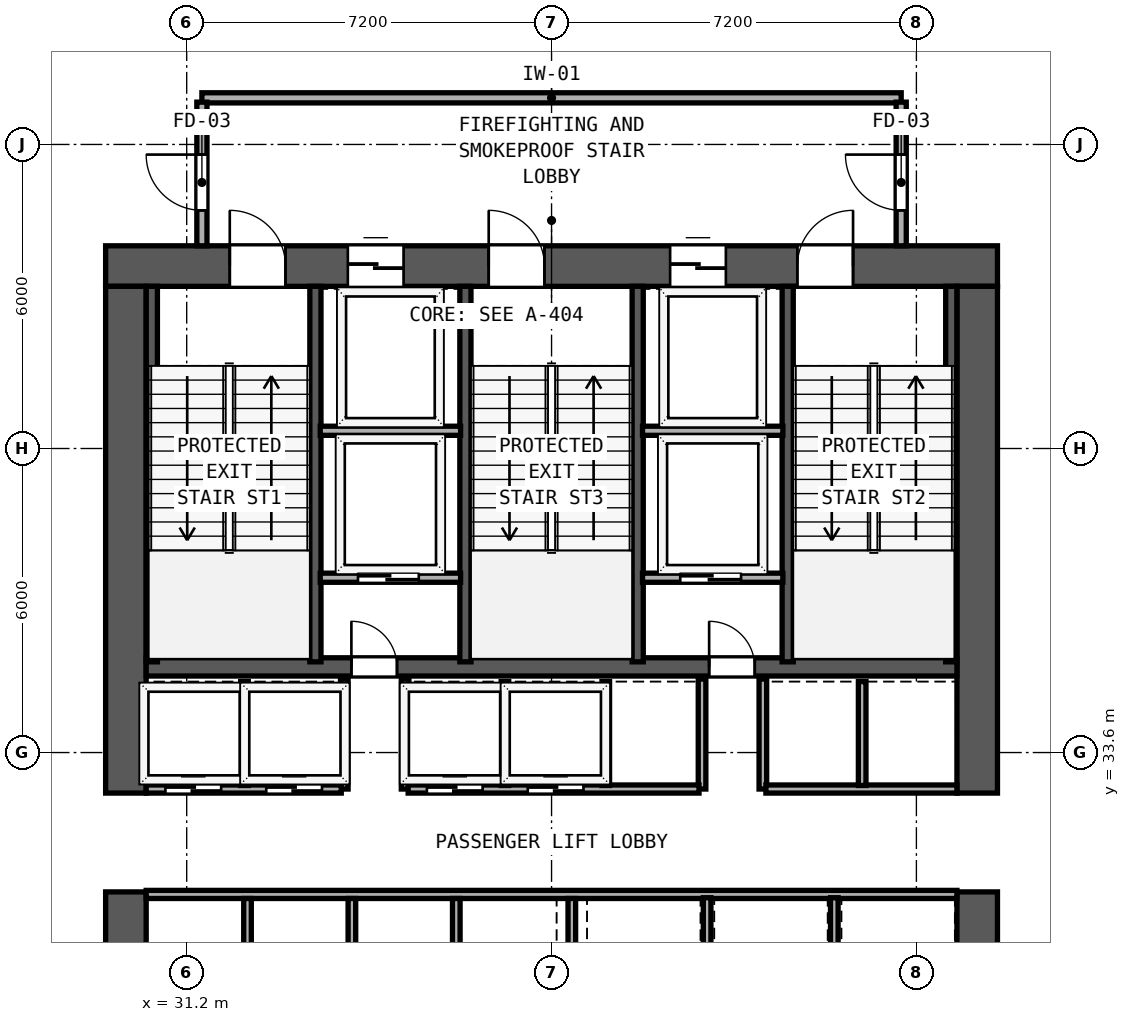
"""IFC4 building model, lengths in metres.
Left out: names, types, materials, properties, quantities, classifications, styles, units other than length and angle.
Written with IfcOpenShell. Run it as: python <this file> out.ifc"""

import sys

from ifc_helpers import new_model, si_unit, direction, frame, frame_2d, origin, place, context, subcontext, project, spatial, rectangle, extrude, element, fill, save


model = new_model("IFC4")
c1 = context("Model", 3, precision=1e-05, world=origin(), true_north=direction((0.0, 1.0)))
c2 = subcontext(c1, "Body", "Model", "MODEL_VIEW")
j1 = project(units=[si_unit("LENGTHUNIT", "METRE"), si_unit("PLANEANGLEUNIT", "RADIAN")], contexts=[c1])
p1 = place(None, origin())
s1 = spatial("IfcSite", under=j1, at=p1, CompositionType="ELEMENT")
p2 = place(p1, origin())
s2 = spatial("IfcBuilding", under=s1, at=p2, CompositionType="ELEMENT")
p3 = place(p2, frame((0.0, 0.0, 5.4)))
s3 = spatial("IfcBuildingStorey", under=s2, at=p3, CompositionType="ELEMENT", Elevation=5.4)
p4 = place(p3, frame((29.6, 43.2, 0.0), z_axis=(0.0, 0.0, 1.0), x_axis=(1.0, 0.0, 0.0)))
e1 = element("IfcWall", 1, at=p4, inside=s3, PredefinedType="SHEAR", context=c2, shape_type="SweptSolid", body=[
    extrude(rectangle(XDim=17.6, YDim=0.8, at=frame_2d((8.8, 0.0))), origin(), (0.0, 0.0, 1.0), 4.56),
])
p5 = place(p4, frame((2.45, 0.0, 0.0)))
e2 = element("IfcOpeningElement", 2, at=p5, cuts=e1, PredefinedType="OPENING", context=c2, shape_type="SweptSolid", body=[
    extrude(rectangle(XDim=1.1, YDim=2.15, at=frame_2d((0.55, 1.075))), frame((0.0, 0.41, 0.0), z_axis=(0.0, -1.0, 0.0), x_axis=(1.0, 0.0, 0.0)), (0.0, 0.0, 1.0), 0.82),
])
p6 = place(p4, frame((7.56, 0.0, 0.0)))
e3 = element("IfcOpeningElement", 3, at=p6, cuts=e1, PredefinedType="OPENING", context=c2, shape_type="SweptSolid", body=[
    extrude(rectangle(XDim=1.1, YDim=2.15, at=frame_2d((0.55, 1.075))), frame((0.0, 0.41, 0.0), z_axis=(0.0, -1.0, 0.0), x_axis=(1.0, 0.0, 0.0)), (0.0, 0.0, 1.0), 0.82),
])
p7 = place(p4, frame((13.65, 0.0, 0.0)))
e4 = element("IfcOpeningElement", 4, at=p7, cuts=e1, PredefinedType="OPENING", context=c2, shape_type="SweptSolid", body=[
    extrude(rectangle(XDim=1.1, YDim=2.15, at=frame_2d((0.55, 1.075))), frame((0.0, 0.41, 0.0), z_axis=(0.0, -1.0, 0.0), x_axis=(1.0, 0.0, 0.0)), (0.0, 0.0, 1.0), 0.82),
])
p8 = place(p4, frame((4.78, 0.0, 0.0)))
e5 = element("IfcOpeningElement", 5, at=p8, cuts=e1, PredefinedType="OPENING", context=c2, shape_type="SweptSolid", body=[
    extrude(rectangle(XDim=1.1, YDim=2.2, at=frame_2d((0.55, 1.1))), frame((0.0, 0.41, 0.0), z_axis=(0.0, -1.0, 0.0), x_axis=(1.0, 0.0, 0.0)), (0.0, 0.0, 1.0), 0.82),
])
p9 = place(p4, frame((11.14, 0.0, 0.0)))
e6 = element("IfcOpeningElement", 6, at=p9, cuts=e1, PredefinedType="OPENING", context=c2, shape_type="SweptSolid", body=[
    extrude(rectangle(XDim=1.1, YDim=2.2, at=frame_2d((0.55, 1.1))), frame((0.0, 0.41, 0.0), z_axis=(0.0, -1.0, 0.0), x_axis=(1.0, 0.0, 0.0)), (0.0, 0.0, 1.0), 0.82),
])
p10 = place(p3, frame((30.0, 26.8, 0.0), z_axis=(0.0, 0.0, 1.0), x_axis=(0.0, 1.0, 0.0)))
e7 = element("IfcWall", 7, at=p10, inside=s3, PredefinedType="SHEAR", context=c2, shape_type="SweptSolid", body=[
    extrude(rectangle(XDim=4.05, YDim=0.8, at=frame_2d((2.025, 0.0))), origin(), (0.0, 0.0, 1.0), 4.56),
])
p11 = place(p3, frame((30.0, 32.8, 0.0), z_axis=(0.0, 0.0, 1.0), x_axis=(0.0, 1.0, 0.0)))
e8 = element("IfcWall", 8, at=p11, inside=s3, PredefinedType="SHEAR", context=c2, shape_type="SweptSolid", body=[
    extrude(rectangle(XDim=10.0, YDim=0.8, at=frame_2d((5.0, 0.0))), origin(), (0.0, 0.0, 1.0), 4.56),
])
p12 = place(p3, frame((46.8, 26.8, 0.0), z_axis=(0.0, 0.0, 1.0), x_axis=(0.0, 1.0, 0.0)))
e9 = element("IfcWall", 9, at=p12, inside=s3, PredefinedType="SHEAR", context=c2, shape_type="SweptSolid", body=[
    extrude(rectangle(XDim=4.05, YDim=0.8, at=frame_2d((2.025, 0.0))), origin(), (0.0, 0.0, 1.0), 4.56),
])
p13 = place(p3, frame((46.8, 32.8, 0.0), z_axis=(0.0, 0.0, 1.0), x_axis=(0.0, 1.0, 0.0)))
e10 = element("IfcWall", 10, at=p13, inside=s3, PredefinedType="SHEAR", context=c2, shape_type="SweptSolid", body=[
    extrude(rectangle(XDim=10.0, YDim=0.8, at=frame_2d((5.0, 0.0))), origin(), (0.0, 0.0, 1.0), 4.56),
])
p14 = place(p3, frame((30.4, 35.29, 0.0), z_axis=(0.0, 0.0, 1.0), x_axis=(1.0, 0.0, 0.0)))
e11 = element("IfcWall", 11, at=p14, inside=s3, PredefinedType="SHEAR", context=c2, shape_type="SweptSolid", body=[
    extrude(rectangle(XDim=16.0, YDim=0.36, at=frame_2d((8.0, 0.0))), origin(), (0.0, 0.0, 1.0), 4.56),
])
p15 = place(p14, frame((4.95, 0.0, 0.0), z_axis=(0.0, 0.0, 1.0), x_axis=(-1.0, 0.0, 0.0)))
e12 = element("IfcOpeningElement", 12, at=p15, cuts=e11, PredefinedType="OPENING", context=c2, shape_type="SweptSolid", body=[
    extrude(rectangle(XDim=0.9, YDim=2.1, at=frame_2d((0.45, 1.05))), frame((0.0, 0.19, 0.0), z_axis=(0.0, -1.0, 0.0), x_axis=(1.0, 0.0, 0.0)), (0.0, 0.0, 1.0), 0.38),
])
p16 = place(p14, frame((12.01, 0.0, 0.0), z_axis=(0.0, 0.0, 1.0), x_axis=(-1.0, 0.0, 0.0)))
e13 = element("IfcOpeningElement", 13, at=p16, cuts=e11, PredefinedType="OPENING", context=c2, shape_type="SweptSolid", body=[
    extrude(rectangle(XDim=0.9, YDim=2.1, at=frame_2d((0.45, 1.05))), frame((0.0, 0.19, 0.0), z_axis=(0.0, -1.0, 0.0), x_axis=(1.0, 0.0, 0.0)), (0.0, 0.0, 1.0), 0.38),
])
for number, where, z_axis, x_axis in (
    (14, (30.512, 35.39, 0.0), (0.0, 0.0, 1.0), (0.0, 1.0, 0.0)),
    (15, (33.74, 35.39, 0.0), (0.0, 0.0, 1.0), (0.0, 1.0, 0.0)),
    (16, (36.7, 35.39, 0.0), (0.0, 0.0, 1.0), (0.0, 1.0, 0.0)),
    (17, (40.1, 35.39, 0.0), (0.0, 0.0, 1.0), (0.0, 1.0, 0.0)),
    (18, (43.06, 35.39, 0.0), (0.0, 0.0, 1.0), (0.0, 1.0, 0.0)),
    (19, (46.288, 35.39, 0.0), (0.0, 0.0, 1.0), (0.0, 1.0, 0.0)),
):
    element("IfcWall", number, at=place(p3, frame(where, z_axis=z_axis, x_axis=x_axis)), inside=s3, PredefinedType="SHEAR", context=c2, shape_type="SweptSolid", body=[
        extrude(rectangle(XDim=7.41, YDim=0.22, at=frame_2d((3.705, 0.0))), origin(), (0.0, 0.0, 1.0), 4.56),
    ])
p17 = place(p3, frame((31.5, 46.52, 0.0), z_axis=(0.0, 0.0, 1.0), x_axis=(1.0, 0.0, 0.0)))
e20 = element("IfcWall", 20, at=p17, inside=s3, PredefinedType="SOLIDWALL", context=c2, shape_type="SweptSolid", body=[
    extrude(rectangle(XDim=13.8, YDim=0.2, at=frame_2d((6.9, 0.0))), origin(), (0.0, 0.0, 1.0), 4.56),
])
p18 = place(p3, frame((31.5, 43.6, 0.0), z_axis=(0.0, 0.0, 1.0), x_axis=(0.0, 1.0, 0.0)))
e21 = element("IfcWall", 21, at=p18, inside=s3, PredefinedType="SOLIDWALL", context=c2, shape_type="SweptSolid", body=[
    extrude(rectangle(XDim=2.835, YDim=0.2, at=frame_2d((1.417, 0.0))), origin(), (0.0, 0.0, 1.0), 4.56),
])
p19 = place(p18, frame((1.8, 0.0, 0.0), z_axis=(0.0, 0.0, 1.0), x_axis=(-1.0, 0.0, 0.0)))
e22 = element("IfcOpeningElement", 22, at=p19, cuts=e21, PredefinedType="OPENING", context=c2, shape_type="SweptSolid", body=[
    extrude(rectangle(XDim=1.1, YDim=2.15, at=frame_2d((0.55, 1.075))), frame((0.0, 0.11, 0.0), z_axis=(0.0, -1.0, 0.0), x_axis=(1.0, 0.0, 0.0)), (0.0, 0.0, 1.0), 0.22),
])
p20 = place(p3, frame((45.3, 43.6, 0.0), z_axis=(0.0, 0.0, 1.0), x_axis=(0.0, 1.0, 0.0)))
e23 = element("IfcWall", 23, at=p20, inside=s3, PredefinedType="SOLIDWALL", context=c2, shape_type="SweptSolid", body=[
    extrude(rectangle(XDim=2.835, YDim=0.2, at=frame_2d((1.417, 0.0))), origin(), (0.0, 0.0, 1.0), 4.56),
])
p21 = place(p20, frame((0.7, 0.0, 0.0)))
e24 = element("IfcOpeningElement", 24, at=p21, cuts=e23, PredefinedType="OPENING", context=c2, shape_type="SweptSolid", body=[
    extrude(rectangle(XDim=1.1, YDim=2.15, at=frame_2d((0.55, 1.075))), frame((0.0, 0.11, 0.0), z_axis=(0.0, -1.0, 0.0), x_axis=(1.0, 0.0, 0.0)), (0.0, 0.0, 1.0), 0.22),
])
for number, where, z_axis, x_axis in (
    (25, (33.835, 39.95, 0.0), (0.0, 0.0, 1.0), (1.0, 0.0, 0.0)),
    (26, (40.195, 39.95, 0.0), (0.0, 0.0, 1.0), (1.0, 0.0, 0.0)),
):
    element("IfcWall", number, at=place(p3, frame(where, z_axis=z_axis, x_axis=x_axis)), inside=s3, PredefinedType="SOLIDWALL", context=c2, shape_type="SweptSolid", body=[
        extrude(rectangle(XDim=2.77, YDim=0.18, at=frame_2d((1.385, 0.0))), origin(), (0.0, 0.0, 1.0), 4.56),
    ])
p22 = place(p3, frame((33.835, 37.05, 0.0), z_axis=(0.0, 0.0, 1.0), x_axis=(1.0, 0.0, 0.0)))
e27 = element("IfcWall", 27, at=p22, inside=s3, PredefinedType="SOLIDWALL", context=c2, shape_type="SweptSolid", body=[
    extrude(rectangle(XDim=2.77, YDim=0.18, at=frame_2d((1.385, 0.0))), origin(), (0.0, 0.0, 1.0), 4.56),
])
p23 = place(p22, frame((1.945, 0.0, 0.0), z_axis=(0.0, 0.0, 1.0), x_axis=(-1.0, 0.0, 0.0)))
e28 = element("IfcOpeningElement", 28, at=p23, cuts=e27, PredefinedType="OPENING", context=c2, shape_type="SweptSolid", body=[
    extrude(rectangle(XDim=1.2, YDim=2.2, at=frame_2d((0.6, 1.1))), frame((0.0, 0.1, 0.0), z_axis=(0.0, -1.0, 0.0), x_axis=(1.0, 0.0, 0.0)), (0.0, 0.0, 1.0), 0.2),
])
for number, where, z_axis, x_axis in (
    (29, (34.31, 32.88, 0.0), (0.0, 0.0, 1.0), (0.0, 1.0, 0.0)),
    (30, (35.51, 32.88, 0.0), (0.0, 0.0, 1.0), (0.0, 1.0, 0.0)),
):
    element("IfcWall", number, at=place(p3, frame(where, z_axis=z_axis, x_axis=x_axis)), inside=s3, PredefinedType="SOLIDWALL", context=c2, shape_type="SweptSolid", body=[
        extrude(rectangle(XDim=2.17, YDim=0.15, at=frame_2d((1.085, 0.0))), origin(), (0.0, 0.0, 1.0), 4.56),
    ])
p24 = place(p3, frame((40.195, 37.05, 0.0), z_axis=(0.0, 0.0, 1.0), x_axis=(1.0, 0.0, 0.0)))
e31 = element("IfcWall", 31, at=p24, inside=s3, PredefinedType="SOLIDWALL", context=c2, shape_type="SweptSolid", body=[
    extrude(rectangle(XDim=2.77, YDim=0.18, at=frame_2d((1.385, 0.0))), origin(), (0.0, 0.0, 1.0), 4.56),
])
p25 = place(p24, frame((1.945, 0.0, 0.0), z_axis=(0.0, 0.0, 1.0), x_axis=(-1.0, 0.0, 0.0)))
e32 = element("IfcOpeningElement", 32, at=p25, cuts=e31, PredefinedType="OPENING", context=c2, shape_type="SweptSolid", body=[
    extrude(rectangle(XDim=1.2, YDim=2.2, at=frame_2d((0.6, 1.1))), frame((0.0, 0.1, 0.0), z_axis=(0.0, -1.0, 0.0), x_axis=(1.0, 0.0, 0.0)), (0.0, 0.0, 1.0), 0.2),
])
for number, where, z_axis, x_axis in (
    (33, (41.37, 32.88, 0.0), (0.0, 0.0, 1.0), (0.0, 1.0, 0.0)),
    (34, (42.57, 32.88, 0.0), (0.0, 0.0, 1.0), (0.0, 1.0, 0.0)),
):
    element("IfcWall", number, at=place(p3, frame(where, z_axis=z_axis, x_axis=x_axis)), inside=s3, PredefinedType="SOLIDWALL", context=c2, shape_type="SweptSolid", body=[
        extrude(rectangle(XDim=2.17, YDim=0.15, at=frame_2d((1.085, 0.0))), origin(), (0.0, 0.0, 1.0), 4.56),
    ])
p26 = place(p3, frame((30.4, 32.88, 0.0), z_axis=(0.0, 0.0, 1.0), x_axis=(1.0, 0.0, 0.0)))
e35 = element("IfcWall", 35, at=p26, inside=s3, PredefinedType="SOLIDWALL", context=c2, shape_type="SweptSolid", body=[
    extrude(rectangle(XDim=3.85, YDim=0.16, at=frame_2d((1.925, 0.0))), origin(), (0.0, 0.0, 1.0), 4.56),
])
p27 = place(p26, frame((1.48, 0.0, 0.0), z_axis=(0.0, 0.0, 1.0), x_axis=(-1.0, 0.0, 0.0)))
e36 = element("IfcOpeningElement", 36, at=p27, cuts=e35, PredefinedType="OPENING", context=c2, shape_type="SweptSolid", body=[
    extrude(rectangle(XDim=1.1, YDim=2.2, at=frame_2d((0.55, 1.1))), frame((0.0, 0.09, 0.0), z_axis=(0.0, -1.0, 0.0), x_axis=(1.0, 0.0, 0.0)), (0.0, 0.0, 1.0), 0.18),
])
p28 = place(p26, frame((3.47, 0.0, 0.0), z_axis=(0.0, 0.0, 1.0), x_axis=(-1.0, 0.0, 0.0)))
e37 = element("IfcOpeningElement", 37, at=p28, cuts=e35, PredefinedType="OPENING", context=c2, shape_type="SweptSolid", body=[
    extrude(rectangle(XDim=1.1, YDim=2.2, at=frame_2d((0.55, 1.1))), frame((0.0, 0.09, 0.0), z_axis=(0.0, -1.0, 0.0), x_axis=(1.0, 0.0, 0.0)), (0.0, 0.0, 1.0), 0.18),
])
p29 = place(p3, frame((35.57, 32.88, 0.0), z_axis=(0.0, 0.0, 1.0), x_axis=(1.0, 0.0, 0.0)))
e38 = element("IfcWall", 38, at=p29, inside=s3, PredefinedType="SOLIDWALL", context=c2, shape_type="SweptSolid", body=[
    extrude(rectangle(XDim=5.74, YDim=0.16, at=frame_2d((2.87, 0.0))), origin(), (0.0, 0.0, 1.0), 4.56),
])
p30 = place(p29, frame((1.47, 0.0, 0.0), z_axis=(0.0, 0.0, 1.0), x_axis=(-1.0, 0.0, 0.0)))
e39 = element("IfcOpeningElement", 39, at=p30, cuts=e38, PredefinedType="OPENING", context=c2, shape_type="SweptSolid", body=[
    extrude(rectangle(XDim=1.1, YDim=2.2, at=frame_2d((0.55, 1.1))), frame((0.0, 0.09, 0.0), z_axis=(0.0, -1.0, 0.0), x_axis=(1.0, 0.0, 0.0)), (0.0, 0.0, 1.0), 0.18),
])
p31 = place(p29, frame((3.46, 0.0, 0.0), z_axis=(0.0, 0.0, 1.0), x_axis=(-1.0, 0.0, 0.0)))
e40 = element("IfcOpeningElement", 40, at=p31, cuts=e38, PredefinedType="OPENING", context=c2, shape_type="SweptSolid", body=[
    extrude(rectangle(XDim=1.1, YDim=2.2, at=frame_2d((0.55, 1.1))), frame((0.0, 0.09, 0.0), z_axis=(0.0, -1.0, 0.0), x_axis=(1.0, 0.0, 0.0)), (0.0, 0.0, 1.0), 0.18),
])
p32 = place(p3, frame((42.63, 32.88, 0.0), z_axis=(0.0, 0.0, 1.0), x_axis=(1.0, 0.0, 0.0)))
e41 = element("IfcWall", 41, at=p32, inside=s3, PredefinedType="SOLIDWALL", context=c2, shape_type="SweptSolid", body=[
    extrude(rectangle(XDim=3.77, YDim=0.16, at=frame_2d((1.885, 0.0))), origin(), (0.0, 0.0, 1.0), 4.56),
])
for number, where, z_axis, x_axis in (
    (42, (32.34, 32.95, 0.0), (0.0, 0.0, 1.0), (0.0, 1.0, 0.0)),
    (43, (37.48, 32.95, 0.0), (0.0, 0.0, 1.0), (0.0, 1.0, 0.0)),
    (44, (39.47, 32.95, 0.0), (0.0, 0.0, 1.0), (0.0, 1.0, 0.0)),
    (45, (44.53, 32.95, 0.0), (0.0, 0.0, 1.0), (0.0, 1.0, 0.0)),
):
    element("IfcWall", number, at=place(p3, frame(where, z_axis=z_axis, x_axis=x_axis)), inside=s3, PredefinedType="SOLIDWALL", context=c2, shape_type="SweptSolid", body=[
        extrude(rectangle(XDim=2.05, YDim=0.15, at=frame_2d((1.025, 0.0))), origin(), (0.0, 0.0, 1.0), 4.56),
    ])
p33 = place(p3, frame((30.4, 30.8, 0.0), z_axis=(0.0, 0.0, 1.0), x_axis=(1.0, 0.0, 0.0)))
e46 = element("IfcWall", 46, at=p33, inside=s3, PredefinedType="SOLIDWALL", context=c2, shape_type="SweptSolid", body=[
    extrude(rectangle(XDim=16.0, YDim=0.16, at=frame_2d((8.0, 0.0))), origin(), (0.0, 0.0, 1.0), 4.56),
])
for number, where, z_axis, x_axis in (
    (47, (32.4, 28.735, 0.0), (0.0, 0.0, 1.0), (0.0, 1.0, 0.0)),
    (48, (34.46, 28.735, 0.0), (0.0, 0.0, 1.0), (0.0, 1.0, 0.0)),
    (49, (36.52, 28.735, 0.0), (0.0, 0.0, 1.0), (0.0, 1.0, 0.0)),
    (50, (38.8, 28.735, 0.0), (0.0, 0.0, 1.0), (0.0, 1.0, 0.0)),
):
    element("IfcWall", number, at=place(p3, frame(where, z_axis=z_axis, x_axis=x_axis)), inside=s3, PredefinedType="SOLIDWALL", context=c2, shape_type="SweptSolid", body=[
        extrude(rectangle(XDim=1.985, YDim=0.15, at=frame_2d((0.992, 0.0))), origin(), (0.0, 0.0, 1.0), 4.56),
    ])
for number, where, z_axis, x_axis in (
    (51, (41.47, 28.75, 0.0), (0.0, 0.0, 1.0), (0.0, 1.0, 0.0)),
    (52, (43.98, 28.75, 0.0), (0.0, 0.0, 1.0), (0.0, 1.0, 0.0)),
):
    element("IfcWall", number, at=place(p3, frame(where, z_axis=z_axis, x_axis=x_axis)), inside=s3, PredefinedType="SOLIDWALL", context=c2, shape_type="SweptSolid", body=[
        extrude(rectangle(XDim=1.985, YDim=0.15, at=frame_2d((0.993, 0.0))), origin(), (0.0, 0.0, 1.0), 4.56),
    ])
p34 = place(p5, origin())
e53 = element("IfcDoor", 53, at=p34, inside=s3, OperationType="SINGLE_SWING_LEFT", PredefinedType="DOOR", context=c2, shape_type="SweptSolid", body=[
    extrude(rectangle(XDim=1.1, YDim=2.15, at=frame_2d((0.55, 1.075))), frame((0.0, 0.185, 0.0), z_axis=(0.0, -1.0, 0.0), x_axis=(1.0, 0.0, 0.0)), (0.0, 0.0, 1.0), 0.05),
])
fill(e2, e53)
p35 = place(p6, origin())
e54 = element("IfcDoor", 54, at=p35, inside=s3, OperationType="SINGLE_SWING_LEFT", PredefinedType="DOOR", context=c2, shape_type="SweptSolid", body=[
    extrude(rectangle(XDim=1.1, YDim=2.15, at=frame_2d((0.55, 1.075))), frame((0.0, 0.185, 0.0), z_axis=(0.0, -1.0, 0.0), x_axis=(1.0, 0.0, 0.0)), (0.0, 0.0, 1.0), 0.05),
])
fill(e3, e54)
p36 = place(p7, origin())
e55 = element("IfcDoor", 55, at=p36, inside=s3, OperationType="SINGLE_SWING_RIGHT", PredefinedType="DOOR", context=c2, shape_type="SweptSolid", body=[
    extrude(rectangle(XDim=1.1, YDim=2.15, at=frame_2d((0.55, 1.075))), frame((0.0, 0.185, 0.0), z_axis=(0.0, -1.0, 0.0), x_axis=(1.0, 0.0, 0.0)), (0.0, 0.0, 1.0), 0.05),
])
fill(e4, e55)
p37 = place(p19, origin())
e56 = element("IfcDoor", 56, at=p37, inside=s3, OperationType="SINGLE_SWING_LEFT", PredefinedType="DOOR", context=c2, shape_type="SweptSolid", body=[
    extrude(rectangle(XDim=1.1, YDim=2.15, at=frame_2d((0.55, 1.075))), frame((0.0, 0.025, 0.0), z_axis=(0.0, -1.0, 0.0), x_axis=(1.0, 0.0, 0.0)), (0.0, 0.0, 1.0), 0.05),
])
fill(e22, e56)
p38 = place(p21, origin())
e57 = element("IfcDoor", 57, at=p38, inside=s3, OperationType="SINGLE_SWING_RIGHT", PredefinedType="DOOR", context=c2, shape_type="SweptSolid", body=[
    extrude(rectangle(XDim=1.1, YDim=2.15, at=frame_2d((0.55, 1.075))), frame((0.0, 0.025, 0.0), z_axis=(0.0, -1.0, 0.0), x_axis=(1.0, 0.0, 0.0)), (0.0, 0.0, 1.0), 0.05),
])
fill(e24, e57)
p39 = place(p8, origin())
e58 = element("IfcDoor", 58, at=p39, inside=s3, OperationType="SLIDING_TO_LEFT", PredefinedType="DOOR", context=c2, shape_type="SweptSolid", body=[
    extrude(rectangle(XDim=1.1, YDim=2.2, at=frame_2d((0.55, 1.1))), frame((0.0, 0.185, 0.0), z_axis=(0.0, -1.0, 0.0), x_axis=(1.0, 0.0, 0.0)), (0.0, 0.0, 1.0), 0.05),
])
fill(e5, e58)
p40 = place(p9, origin())
e59 = element("IfcDoor", 59, at=p40, inside=s3, OperationType="SLIDING_TO_LEFT", PredefinedType="DOOR", context=c2, shape_type="SweptSolid", body=[
    extrude(rectangle(XDim=1.1, YDim=2.2, at=frame_2d((0.55, 1.1))), frame((0.0, 0.185, 0.0), z_axis=(0.0, -1.0, 0.0), x_axis=(1.0, 0.0, 0.0)), (0.0, 0.0, 1.0), 0.05),
])
fill(e6, e59)
p41 = place(p23, origin())
e60 = element("IfcDoor", 60, at=p41, inside=s3, OperationType="SLIDING_TO_RIGHT", PredefinedType="DOOR", context=c2, shape_type="SweptSolid", body=[
    extrude(rectangle(XDim=1.2, YDim=2.2, at=frame_2d((0.6, 1.1))), frame((0.0, 0.025, 0.0), z_axis=(0.0, -1.0, 0.0), x_axis=(1.0, 0.0, 0.0)), (0.0, 0.0, 1.0), 0.05),
])
fill(e28, e60)
p42 = place(p15, origin())
e61 = element("IfcDoor", 61, at=p42, inside=s3, OperationType="SINGLE_SWING_RIGHT", PredefinedType="DOOR", context=c2, shape_type="SweptSolid", body=[
    extrude(rectangle(XDim=0.9, YDim=2.1, at=frame_2d((0.45, 1.05))), frame((0.0, 0.025, 0.0), z_axis=(0.0, -1.0, 0.0), x_axis=(1.0, 0.0, 0.0)), (0.0, 0.0, 1.0), 0.05),
])
fill(e12, e61)
p43 = place(p25, origin())
e62 = element("IfcDoor", 62, at=p43, inside=s3, OperationType="SLIDING_TO_RIGHT", PredefinedType="DOOR", context=c2, shape_type="SweptSolid", body=[
    extrude(rectangle(XDim=1.2, YDim=2.2, at=frame_2d((0.6, 1.1))), frame((0.0, 0.025, 0.0), z_axis=(0.0, -1.0, 0.0), x_axis=(1.0, 0.0, 0.0)), (0.0, 0.0, 1.0), 0.05),
])
fill(e32, e62)
p44 = place(p16, origin())
e63 = element("IfcDoor", 63, at=p44, inside=s3, OperationType="SINGLE_SWING_RIGHT", PredefinedType="DOOR", context=c2, shape_type="SweptSolid", body=[
    extrude(rectangle(XDim=0.9, YDim=2.1, at=frame_2d((0.45, 1.05))), frame((0.0, 0.025, 0.0), z_axis=(0.0, -1.0, 0.0), x_axis=(1.0, 0.0, 0.0)), (0.0, 0.0, 1.0), 0.05),
])
fill(e13, e63)
p45 = place(p27, origin())
e64 = element("IfcDoor", 64, at=p45, inside=s3, OperationType="SLIDING_TO_LEFT", PredefinedType="DOOR", context=c2, shape_type="SweptSolid", body=[
    extrude(rectangle(XDim=1.1, YDim=2.2, at=frame_2d((0.55, 1.1))), frame((0.0, 0.025, 0.0), z_axis=(0.0, -1.0, 0.0), x_axis=(1.0, 0.0, 0.0)), (0.0, 0.0, 1.0), 0.05),
])
fill(e36, e64)
p46 = place(p28, origin())
e65 = element("IfcDoor", 65, at=p46, inside=s3, OperationType="SLIDING_TO_LEFT", PredefinedType="DOOR", context=c2, shape_type="SweptSolid", body=[
    extrude(rectangle(XDim=1.1, YDim=2.2, at=frame_2d((0.55, 1.1))), frame((0.0, 0.025, 0.0), z_axis=(0.0, -1.0, 0.0), x_axis=(1.0, 0.0, 0.0)), (0.0, 0.0, 1.0), 0.05),
])
fill(e37, e65)
p47 = place(p30, origin())
e66 = element("IfcDoor", 66, at=p47, inside=s3, OperationType="SLIDING_TO_LEFT", PredefinedType="DOOR", context=c2, shape_type="SweptSolid", body=[
    extrude(rectangle(XDim=1.1, YDim=2.2, at=frame_2d((0.55, 1.1))), frame((0.0, 0.025, 0.0), z_axis=(0.0, -1.0, 0.0), x_axis=(1.0, 0.0, 0.0)), (0.0, 0.0, 1.0), 0.05),
])
fill(e39, e66)
p48 = place(p31, origin())
e67 = element("IfcDoor", 67, at=p48, inside=s3, OperationType="SLIDING_TO_LEFT", PredefinedType="DOOR", context=c2, shape_type="SweptSolid", body=[
    extrude(rectangle(XDim=1.1, YDim=2.2, at=frame_2d((0.55, 1.1))), frame((0.0, 0.025, 0.0), z_axis=(0.0, -1.0, 0.0), x_axis=(1.0, 0.0, 0.0)), (0.0, 0.0, 1.0), 0.05),
])
fill(e40, e67)
save(model, sys.argv[1])
